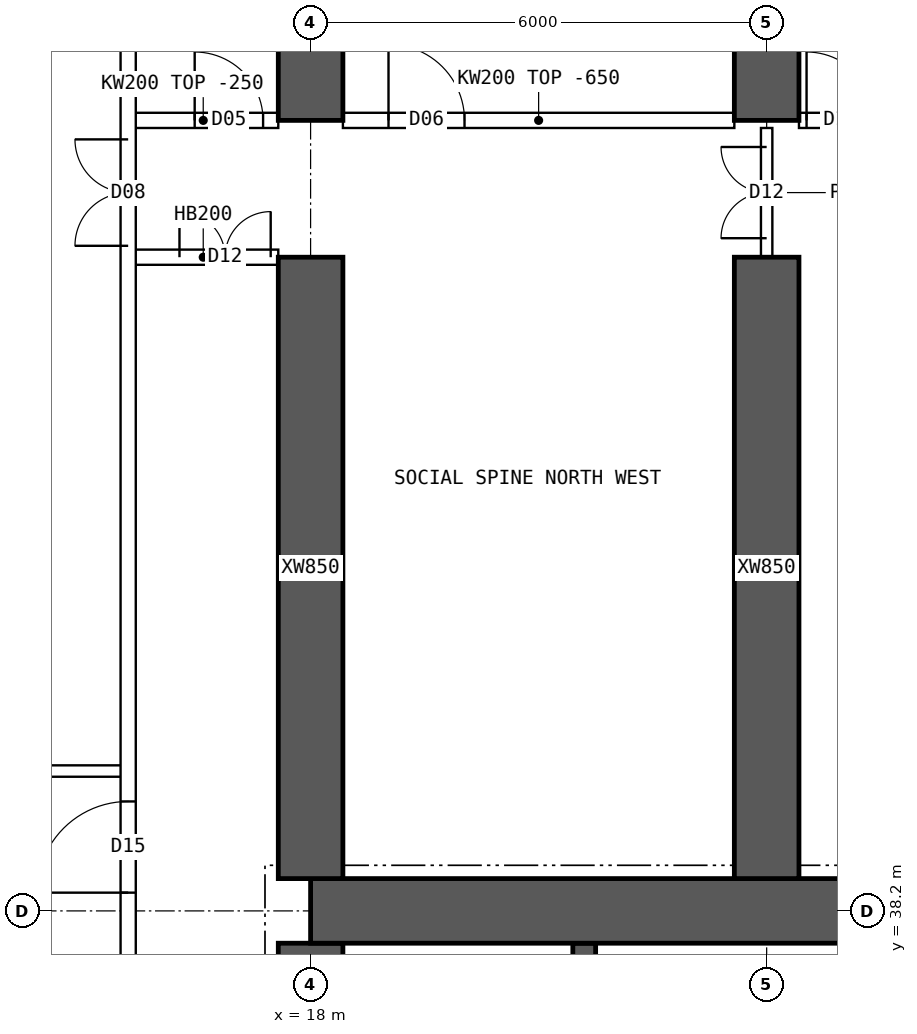
"""IFC4 building model, lengths in metres.
Left out: names, types, materials, properties, quantities, classifications, styles, units other than length and angle.
Written with IfcOpenShell. Run it as: python <this file> out.ifc"""

import sys

from ifc_helpers import new_model, si_unit, direction, frame, frame_2d, origin, place, context, subcontext, project, spatial, polyline, rectangle, outline, extrude, element, fill, save


model = new_model("IFC4")
c1 = context("Model", 3, precision=1e-05, world=origin(), true_north=direction((0.0, 1.0)))
c2 = subcontext(c1, "Body", "Model", "MODEL_VIEW")
j1 = project(units=[si_unit("LENGTHUNIT", "METRE"), si_unit("PLANEANGLEUNIT", "RADIAN")], contexts=[c1])
p1 = place(None, origin())
s1 = spatial("IfcSite", under=j1, at=p1, CompositionType="ELEMENT")
p2 = place(p1, origin())
s2 = spatial("IfcBuilding", under=s1, at=p2, CompositionType="ELEMENT")
p3 = place(p2, frame((0.0, 0.0, 156.1)))
s3 = spatial("IfcBuildingStorey", under=s2, at=p3, CompositionType="ELEMENT", Elevation=156.1)
p4 = place(p3, frame((18.0, 38.2, 0.0), z_axis=(0.0, 0.0, 1.0), x_axis=(1.0, 0.0, 0.0)))
e1 = element("IfcWall", 1, at=p4, inside=s3, PredefinedType="SHEAR", context=c2, shape_type="SweptSolid", body=[
    extrude(rectangle(XDim=48.0, YDim=0.85, at=frame_2d((24.0, 0.0))), origin(), (0.0, 0.0, 1.0), 3.75),
])
p5 = place(p3, frame((18.0, 26.225, 0.0), z_axis=(0.0, 0.0, 1.0), x_axis=(0.0, 1.0, 0.0)))
e2 = element("IfcWall", 2, at=p5, inside=s3, PredefinedType="SHEAR", context=c2, shape_type="SweptSolid", body=[
    extrude(rectangle(XDim=11.55, YDim=0.85, at=frame_2d((5.775, 0.0))), origin(), (0.0, 0.0, 1.0), 3.75),
])
p6 = place(p5, frame((5.075, 0.0, 0.0)))
e3 = element("IfcOpeningElement", 3, at=p6, cuts=e2, PredefinedType="OPENING", context=c2, shape_type="SweptSolid", body=[
    extrude(rectangle(XDim=1.2, YDim=2.1, at=frame_2d((0.6, 1.05))), frame((0.0, 0.435, 0.0), z_axis=(0.0, -1.0, 0.0), x_axis=(1.0, 0.0, 0.0)), (0.0, 0.0, 1.0), 0.87),
])
p7 = place(p3, frame((21.6, 34.75, 0.0), z_axis=(0.0, 0.0, 1.0), x_axis=(0.0, 1.0, 0.0)))
e4 = element("IfcWall", 4, at=p7, inside=s3, PredefinedType="SHEAR", context=c2, shape_type="SweptSolid", body=[
    extrude(rectangle(XDim=3.025, YDim=0.3, at=frame_2d((1.512, 0.0))), origin(), (0.0, 0.0, 1.0), 3.75),
])
p8 = place(p3, frame((18.0, 48.6, 0.0), z_axis=(0.0, 0.0, 1.0), x_axis=(0.0, 1.0, 0.0)))
e5 = element("IfcWall", 5, at=p8, inside=s3, PredefinedType="SHEAR", context=c2, shape_type="SweptSolid", body=[
    extrude(rectangle(XDim=5.4, YDim=0.85, at=frame_2d((2.7, 0.0))), origin(), (0.0, 0.0, 1.0), 3.75),
])
p9 = place(p3, frame((18.0, 38.625, 0.0), z_axis=(0.0, 0.0, 1.0), x_axis=(0.0, 1.0, 0.0)))
e6 = element("IfcWall", 6, at=p9, inside=s3, PredefinedType="SHEAR", context=c2, shape_type="SweptSolid", body=[
    extrude(rectangle(XDim=8.175, YDim=0.85, at=frame_2d((4.087, 0.0))), origin(), (0.0, 0.0, 1.0), 3.75),
])
p10 = place(p3, frame((24.0, 48.6, 0.0), z_axis=(0.0, 0.0, 1.0), x_axis=(0.0, 1.0, 0.0)))
e7 = element("IfcWall", 7, at=p10, inside=s3, PredefinedType="SHEAR", context=c2, shape_type="SweptSolid", body=[
    extrude(rectangle(XDim=5.4, YDim=0.85, at=frame_2d((2.7, 0.0))), origin(), (0.0, 0.0, 1.0), 3.75),
])
p11 = place(p3, frame((24.0, 38.625, 0.0), z_axis=(0.0, 0.0, 1.0), x_axis=(0.0, 1.0, 0.0)))
e8 = element("IfcWall", 8, at=p11, inside=s3, PredefinedType="SHEAR", context=c2, shape_type="SweptSolid", body=[
    extrude(rectangle(XDim=8.175, YDim=0.85, at=frame_2d((4.087, 0.0))), origin(), (0.0, 0.0, 1.0), 3.75),
])
p12 = place(p3, frame((15.6, 48.6, 0.0), z_axis=(0.0, 0.0, 1.0), x_axis=(1.0, 0.0, 0.0)))
e9 = element("IfcWall", 9, at=p12, inside=s3, PredefinedType="SOLIDWALL", context=c2, shape_type="SweptSolid", body=[
    extrude(rectangle(XDim=1.975, YDim=0.2, at=frame_2d((0.987, 0.0))), origin(), (0.0, 0.0, 1.0), 3.5),
])
p13 = place(p12, frame((0.875, 0.0, 0.0)))
e10 = element("IfcOpeningElement", 10, at=p13, cuts=e9, PredefinedType="OPENING", context=c2, shape_type="SweptSolid", body=[
    extrude(rectangle(XDim=0.9, YDim=2.1, at=frame_2d((0.45, 1.05))), frame((0.0, 0.11, 0.0), z_axis=(0.0, -1.0, 0.0), x_axis=(1.0, 0.0, 0.0)), (0.0, 0.0, 1.0), 0.22),
])
p14 = place(p3, frame((15.6, 46.8, 0.0), z_axis=(0.0, 0.0, 1.0), x_axis=(1.0, 0.0, 0.0)))
e11 = element("IfcWall", 11, at=p14, inside=s3, PredefinedType="SOLIDWALL", context=c2, shape_type="SweptSolid", body=[
    extrude(rectangle(XDim=1.975, YDim=0.2, at=frame_2d((0.987, 0.0))), origin(), (0.0, 0.0, 1.0), 3.5),
])
p15 = place(p14, frame((0.675, 0.0, 0.0)))
e12 = element("IfcOpeningElement", 12, at=p15, cuts=e11, PredefinedType="OPENING", context=c2, shape_type="SweptSolid", body=[
    extrude(rectangle(XDim=1.2, YDim=2.1, at=frame_2d((0.6, 1.05))), frame((0.0, 0.11, 0.0), z_axis=(0.0, -1.0, 0.0), x_axis=(1.0, 0.0, 0.0)), (0.0, 0.0, 1.0), 0.22),
])
p16 = place(p3, frame((18.425, 48.6, 0.0), z_axis=(0.0, 0.0, 1.0), x_axis=(1.0, 0.0, 0.0)))
e13 = element("IfcWall", 13, at=p16, inside=s3, PredefinedType="SOLIDWALL", context=c2, shape_type="SweptSolid", body=[
    extrude(outline(polyline([(0.0, 0.0), (5.15, 0.0), (5.15, 3.1), (0.0, 3.1), (0.0, 0.0)])), frame((0.0, 0.1, 0.0), z_axis=(0.0, -1.0, 0.0), x_axis=(1.0, 0.0, 0.0)), (0.0, 0.0, 1.0), 0.2),
])
p17 = place(p16, frame((0.6, 0.0, 0.0)))
e14 = element("IfcOpeningElement", 14, at=p17, cuts=e13, PredefinedType="OPENING", context=c2, shape_type="SweptSolid", body=[
    extrude(rectangle(XDim=1.0, YDim=2.1, at=frame_2d((0.5, 1.05))), frame((0.0, 0.11, 0.0), z_axis=(0.0, -1.0, 0.0), x_axis=(1.0, 0.0, 0.0)), (0.0, 0.0, 1.0), 0.22),
])
p18 = place(p3, frame((24.425, 48.6, 0.0), z_axis=(0.0, 0.0, 1.0), x_axis=(1.0, 0.0, 0.0)))
e15 = element("IfcWall", 15, at=p18, inside=s3, PredefinedType="SOLIDWALL", context=c2, shape_type="SweptSolid", body=[
    extrude(outline(polyline([(0.0, 0.0), (5.15, 0.0), (5.15, 3.1), (0.0, 3.1), (0.0, 0.0)])), frame((0.0, 0.1, 0.0), z_axis=(0.0, -1.0, 0.0), x_axis=(1.0, 0.0, 0.0)), (0.0, 0.0, 1.0), 0.2),
])
p19 = place(p18, frame((0.1, 0.0, 0.0)))
e16 = element("IfcOpeningElement", 16, at=p19, cuts=e15, PredefinedType="OPENING", context=c2, shape_type="SweptSolid", body=[
    extrude(rectangle(XDim=0.9, YDim=2.1, at=frame_2d((0.45, 1.05))), frame((0.0, 0.11, 0.0), z_axis=(0.0, -1.0, 0.0), x_axis=(1.0, 0.0, 0.0)), (0.0, 0.0, 1.0), 0.22),
])
p20 = place(p3, frame((24.0, 46.8, 0.0), z_axis=(0.0, 0.0, 1.0), x_axis=(0.0, 1.0, 0.0)))
e17 = element("IfcWall", 17, at=p20, inside=s3, PredefinedType="PARTITIONING", context=c2, shape_type="SweptSolid", body=[
    extrude(outline(polyline([(0.0, 0.0), (1.7, 0.0), (1.7, 3.1), (0.0, 3.1), (0.0, 0.0)])), frame((0.0, 0.075, 0.0), z_axis=(0.0, -1.0, 0.0), x_axis=(1.0, 0.0, 0.0)), (0.0, 0.0, 1.0), 0.15),
])
p21 = place(p20, frame((0.25, 0.0, 0.0)))
e18 = element("IfcOpeningElement", 18, at=p21, cuts=e17, PredefinedType="OPENING", context=c2, shape_type="SweptSolid", body=[
    extrude(rectangle(XDim=1.2, YDim=2.1, at=frame_2d((0.6, 1.05))), frame((0.0, 0.085, 0.0), z_axis=(0.0, -1.0, 0.0), x_axis=(1.0, 0.0, 0.0)), (0.0, 0.0, 1.0), 0.17),
])
p22 = place(p3, frame((15.6, 10.446, 0.0), z_axis=(0.0, 0.0, 1.0), x_axis=(0.0, 1.0, 0.0)))
e19 = element("IfcWall", 19, at=p22, inside=s3, PredefinedType="SOLIDWALL", context=c2, shape_type="SweptSolid", body=[
    extrude(rectangle(XDim=43.107, YDim=0.2, at=frame_2d((21.554, 0.0))), origin(), (0.0, 0.0, 1.0), 3.5),
])
p23 = place(p22, frame((13.914, 0.0, 0.0)))
e20 = element("IfcOpeningElement", 20, at=p23, cuts=e19, PredefinedType="OPENING", context=c2, shape_type="SweptSolid", body=[
    extrude(rectangle(XDim=1.2, YDim=2.1, at=frame_2d((0.6, 1.05))), frame((0.0, 0.11, 0.0), z_axis=(0.0, -1.0, 0.0), x_axis=(1.0, 0.0, 0.0)), (0.0, 0.0, 1.0), 0.22),
])
p24 = place(p22, frame((27.994, 0.0, 0.0)))
e21 = element("IfcOpeningElement", 21, at=p24, cuts=e19, PredefinedType="OPENING", context=c2, shape_type="SweptSolid", body=[
    extrude(rectangle(XDim=1.2, YDim=2.1, at=frame_2d((0.6, 1.05))), frame((0.0, 0.11, 0.0), z_axis=(0.0, -1.0, 0.0), x_axis=(1.0, 0.0, 0.0)), (0.0, 0.0, 1.0), 0.22),
])
p25 = place(p22, frame((5.104, 0.0, 0.0)))
e22 = element("IfcOpeningElement", 22, at=p25, cuts=e19, PredefinedType="OPENING", context=c2, shape_type="SweptSolid", body=[
    extrude(rectangle(XDim=1.4, YDim=2.1, at=frame_2d((0.7, 1.05))), frame((0.0, 0.11, 0.0), z_axis=(0.0, -1.0, 0.0), x_axis=(1.0, 0.0, 0.0)), (0.0, 0.0, 1.0), 0.22),
])
p26 = place(p22, frame((36.504, 0.0, 0.0)))
e23 = element("IfcOpeningElement", 23, at=p26, cuts=e19, PredefinedType="OPENING", context=c2, shape_type="SweptSolid", body=[
    extrude(rectangle(XDim=1.4, YDim=2.1, at=frame_2d((0.7, 1.05))), frame((0.0, 0.11, 0.0), z_axis=(0.0, -1.0, 0.0), x_axis=(1.0, 0.0, 0.0)), (0.0, 0.0, 1.0), 0.22),
])
p27 = place(p3, frame((8.705, 40.04, 0.0), z_axis=(0.0, 0.0, 1.0), x_axis=(1.0, 0.0, 0.0)))
e24 = element("IfcWall", 24, at=p27, inside=s3, PredefinedType="PARTITIONING", context=c2, shape_type="SweptSolid", body=[
    extrude(rectangle(XDim=6.82, YDim=0.15, at=frame_2d((3.41, 0.0))), origin(), (0.0, 0.0, 1.0), 3.5),
])
p28 = place(p15, origin())
e25 = element("IfcDoor", 25, at=p28, inside=s3, OperationType="DOUBLE_DOOR_SINGLE_SWING", PredefinedType="DOOR", context=c2, shape_type="SweptSolid", body=[
    extrude(rectangle(XDim=1.2, YDim=2.1, at=frame_2d((0.6, 1.05))), frame((0.0, 0.025, 0.0), z_axis=(0.0, -1.0, 0.0), x_axis=(1.0, 0.0, 0.0)), (0.0, 0.0, 1.0), 0.05),
])
fill(e12, e25)
p29 = place(p17, origin())
e26 = element("IfcDoor", 26, at=p29, inside=s3, OperationType="SINGLE_SWING_LEFT", PredefinedType="DOOR", context=c2, shape_type="SweptSolid", body=[
    extrude(rectangle(XDim=1.0, YDim=2.1, at=frame_2d((0.5, 1.05))), frame((0.0, 0.025, 0.0), z_axis=(0.0, -1.0, 0.0), x_axis=(1.0, 0.0, 0.0)), (0.0, 0.0, 1.0), 0.05),
])
fill(e14, e26)
p30 = place(p19, origin())
e27 = element("IfcDoor", 27, at=p30, inside=s3, OperationType="SINGLE_SWING_LEFT", PredefinedType="DOOR", context=c2, shape_type="SweptSolid", body=[
    extrude(rectangle(XDim=0.9, YDim=2.1, at=frame_2d((0.45, 1.05))), frame((0.0, 0.025, 0.0), z_axis=(0.0, -1.0, 0.0), x_axis=(1.0, 0.0, 0.0)), (0.0, 0.0, 1.0), 0.05),
])
fill(e16, e27)
p31 = place(p21, origin())
e28 = element("IfcDoor", 28, at=p31, inside=s3, OperationType="DOUBLE_DOOR_SINGLE_SWING", PredefinedType="DOOR", context=c2, shape_type="SweptSolid", body=[
    extrude(rectangle(XDim=1.2, YDim=2.1, at=frame_2d((0.6, 1.05))), frame((0.0, 0.025, 0.0), z_axis=(0.0, -1.0, 0.0), x_axis=(1.0, 0.0, 0.0)), (0.0, 0.0, 1.0), 0.05),
])
fill(e18, e28)
p32 = place(p24, origin())
e29 = element("IfcDoor", 29, at=p32, inside=s3, OperationType="SINGLE_SWING_LEFT", PredefinedType="DOOR", context=c2, shape_type="SweptSolid", body=[
    extrude(rectangle(XDim=1.2, YDim=2.1, at=frame_2d((0.6, 1.05))), frame((0.0, 0.025, 0.0), z_axis=(0.0, -1.0, 0.0), x_axis=(1.0, 0.0, 0.0)), (0.0, 0.0, 1.0), 0.05),
])
fill(e21, e29)
p33 = place(p26, origin())
e30 = element("IfcDoor", 30, at=p33, inside=s3, OperationType="DOUBLE_DOOR_SINGLE_SWING", PredefinedType="DOOR", context=c2, shape_type="SweptSolid", body=[
    extrude(rectangle(XDim=1.4, YDim=2.1, at=frame_2d((0.7, 1.05))), frame((0.0, 0.025, 0.0), z_axis=(0.0, -1.0, 0.0), x_axis=(1.0, 0.0, 0.0)), (0.0, 0.0, 1.0), 0.05),
])
fill(e23, e30)
p34 = place(p13, origin())
e31 = element("IfcDoor", 31, at=p34, inside=s3, OperationType="SINGLE_SWING_LEFT", PredefinedType="DOOR", context=c2, shape_type="SweptSolid", body=[
    extrude(rectangle(XDim=0.9, YDim=2.1, at=frame_2d((0.45, 1.05))), frame((0.0, 0.025, 0.0), z_axis=(0.0, -1.0, 0.0), x_axis=(1.0, 0.0, 0.0)), (0.0, 0.0, 1.0), 0.05),
])
fill(e10, e31)
save(model, sys.argv[1])
